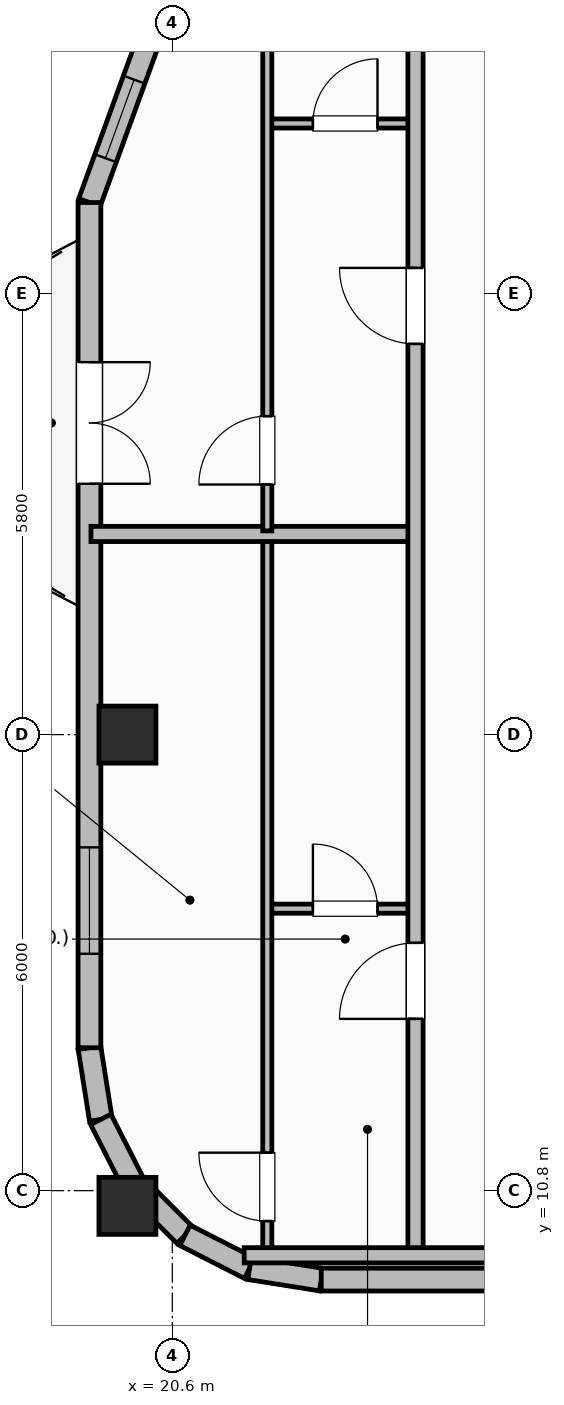
"""IFC4 building model, lengths in metres.
Left out: names, types, materials, properties, quantities, classifications, styles, units other than length and angle.
Written with IfcOpenShell. Run it as: python <this file> out.ifc"""

import sys

from ifc_helpers import new_model, si_unit, direction, frame, frame_2d, origin, origin_2d, place, context, subcontext, project, spatial, rectangle, extrude, element, fill, save


model = new_model("IFC4")
c1 = context("Model", 3, precision=1e-05, world=origin(), true_north=direction((0.0, 1.0)))
c2 = subcontext(c1, "Body", "Model", "MODEL_VIEW")
j1 = project(units=[si_unit("LENGTHUNIT", "METRE"), si_unit("PLANEANGLEUNIT", "RADIAN")], contexts=[c1])
p1 = place(None, origin())
s1 = spatial("IfcSite", under=j1, at=p1, CompositionType="ELEMENT")
p2 = place(p1, origin())
s2 = spatial("IfcBuilding", under=s1, at=p2, CompositionType="ELEMENT")
p3 = place(p2, frame((0.0, 0.0, 267.6)))
s3 = spatial("IfcBuildingStorey", under=s2, at=p3, CompositionType="ELEMENT", Elevation=267.6)
for number, where, z_axis, x_axis in (
    (1, (20.01, 10.6, 0.0), (0.0, 0.0, 1.0), (1.0, 0.0, 0.0)),
    (2, (20.01, 16.8, 0.0), (0.0, 0.0, 1.0), (1.0, 0.0, 0.0)),
):
    element("IfcColumn", number, at=place(p3, frame(where, z_axis=z_axis, x_axis=x_axis)), inside=s3, PredefinedType="COLUMN", context=c2, shape_type="SweptSolid", body=[
        extrude(rectangle(XDim=0.75, YDim=0.75, at=origin_2d()), origin(), (0.0, 0.0, 1.0), 3.7),
    ])
p4 = place(p3, frame((19.51, 12.68, 0.0), z_axis=(0.0, 0.0, 1.0), x_axis=(0.156343617883, -0.987702725088, 0.0)))
e3 = element("IfcWall", 3, at=p4, inside=s3, PredefinedType="SOLIDWALL", context=c2, shape_type="SweptSolid", body=[
    extrude(rectangle(XDim=0.954, YDim=0.3, at=frame_2d((0.477, 0.0))), origin(), (0.0, 0.0, 1.0), 2.73),
])
for number, where, z_axis, x_axis in (
    (4, (19.659, 11.738, 0.0), (0.0, 0.0, 1.0), (0.454, -0.891, 0.0)),
    (5, (20.093, 10.887, 0.0), (0.0, 0.0, 1.0), (0.707, -0.707, 0.0)),
):
    element("IfcWall", number, at=place(p3, frame(where, z_axis=z_axis, x_axis=x_axis)), inside=s3, PredefinedType="SOLIDWALL", context=c2, shape_type="SweptSolid", body=[
        extrude(rectangle(XDim=0.954, YDim=0.3, at=frame_2d((0.477, 0.0))), origin(), (0.0, 0.0, 1.0), 2.73),
    ])
p5 = place(p3, frame((20.767, 10.212, 0.0), z_axis=(0.0, 0.0, 1.0), x_axis=(0.891023873617, -0.45395644796, 0.0)))
e6 = element("IfcWall", 6, at=p5, inside=s3, PredefinedType="SOLIDWALL", context=c2, shape_type="SweptSolid", body=[
    extrude(rectangle(XDim=0.954, YDim=0.3, at=frame_2d((0.477, 0.0))), origin(), (0.0, 0.0, 1.0), 2.73),
])
p6 = place(p3, frame((21.617, 9.779, 0.0), z_axis=(0.0, 0.0, 1.0), x_axis=(0.987669453596, -0.156553666304, 0.0)))
e7 = element("IfcWall", 7, at=p6, inside=s3, PredefinedType="SOLIDWALL", context=c2, shape_type="SweptSolid", body=[
    extrude(rectangle(XDim=0.954, YDim=0.3, at=frame_2d((0.477, 0.0))), origin(), (0.0, 0.0, 1.0), 2.73),
])
p7 = place(p3, frame((22.56, 9.63, 0.0), z_axis=(0.0, 0.0, 1.0), x_axis=(1.0, 0.0, 0.0)))
e8 = element("IfcWall", 8, at=p7, inside=s3, PredefinedType="SOLIDWALL", context=c2, shape_type="SweptSolid", body=[
    extrude(rectangle(XDim=33.28, YDim=0.3, at=frame_2d((16.64, 0.0))), origin(), (0.0, 0.0, 1.0), 2.73),
])
p8 = place(p7, frame((4.311, 0.0, 0.76)))
e9 = element("IfcOpeningElement", 9, at=p8, cuts=e8, PredefinedType="OPENING", context=c2, shape_type="SweptSolid", body=[
    extrude(rectangle(XDim=1.4, YDim=1.85, at=frame_2d((0.7, 0.925))), frame((0.0, 0.16, 0.0), z_axis=(0.0, -1.0, 0.0), x_axis=(1.0, 0.0, 0.0)), (0.0, 0.0, 1.0), 0.32),
])
p9 = place(p7, frame((7.218, 0.0, 0.76)))
e10 = element("IfcOpeningElement", 10, at=p9, cuts=e8, PredefinedType="OPENING", context=c2, shape_type="SweptSolid", body=[
    extrude(rectangle(XDim=1.4, YDim=1.85, at=frame_2d((0.7, 0.925))), frame((0.0, 0.16, 0.0), z_axis=(0.0, -1.0, 0.0), x_axis=(1.0, 0.0, 0.0)), (0.0, 0.0, 1.0), 0.32),
])
p10 = place(p7, frame((9.775, 0.0, 0.76)))
e11 = element("IfcOpeningElement", 11, at=p10, cuts=e8, PredefinedType="OPENING", context=c2, shape_type="SweptSolid", body=[
    extrude(rectangle(XDim=1.4, YDim=1.85, at=frame_2d((0.7, 0.925))), frame((0.0, 0.16, 0.0), z_axis=(0.0, -1.0, 0.0), x_axis=(1.0, 0.0, 0.0)), (0.0, 0.0, 1.0), 0.32),
])
p11 = place(p7, frame((14.083, 0.0, 0.76)))
e12 = element("IfcOpeningElement", 12, at=p11, cuts=e8, PredefinedType="OPENING", context=c2, shape_type="SweptSolid", body=[
    extrude(rectangle(XDim=1.4, YDim=1.85, at=frame_2d((0.7, 0.925))), frame((0.0, 0.16, 0.0), z_axis=(0.0, -1.0, 0.0), x_axis=(1.0, 0.0, 0.0)), (0.0, 0.0, 1.0), 0.32),
])
p12 = place(p7, frame((15.94, 0.0, 0.76)))
e13 = element("IfcOpeningElement", 13, at=p12, cuts=e8, PredefinedType="OPENING", context=c2, shape_type="SweptSolid", body=[
    extrude(rectangle(XDim=1.4, YDim=1.85, at=frame_2d((0.7, 0.925))), frame((0.0, 0.16, 0.0), z_axis=(0.0, -1.0, 0.0), x_axis=(1.0, 0.0, 0.0)), (0.0, 0.0, 1.0), 0.32),
])
p13 = place(p7, frame((17.797, 0.0, 0.76)))
e14 = element("IfcOpeningElement", 14, at=p13, cuts=e8, PredefinedType="OPENING", context=c2, shape_type="SweptSolid", body=[
    extrude(rectangle(XDim=1.4, YDim=1.85, at=frame_2d((0.7, 0.925))), frame((0.0, 0.16, 0.0), z_axis=(0.0, -1.0, 0.0), x_axis=(1.0, 0.0, 0.0)), (0.0, 0.0, 1.0), 0.32),
])
p14 = place(p7, frame((22.104, 0.0, 0.76)))
e15 = element("IfcOpeningElement", 15, at=p14, cuts=e8, PredefinedType="OPENING", context=c2, shape_type="SweptSolid", body=[
    extrude(rectangle(XDim=1.4, YDim=1.85, at=frame_2d((0.7, 0.925))), frame((0.0, 0.16, 0.0), z_axis=(0.0, -1.0, 0.0), x_axis=(1.0, 0.0, 0.0)), (0.0, 0.0, 1.0), 0.32),
])
p15 = place(p7, frame((24.662, 0.0, 0.76)))
e16 = element("IfcOpeningElement", 16, at=p15, cuts=e8, PredefinedType="OPENING", context=c2, shape_type="SweptSolid", body=[
    extrude(rectangle(XDim=1.4, YDim=1.85, at=frame_2d((0.7, 0.925))), frame((0.0, 0.16, 0.0), z_axis=(0.0, -1.0, 0.0), x_axis=(1.0, 0.0, 0.0)), (0.0, 0.0, 1.0), 0.32),
])
p16 = place(p7, frame((27.569, 0.0, 0.76)))
e17 = element("IfcOpeningElement", 17, at=p16, cuts=e8, PredefinedType="OPENING", context=c2, shape_type="SweptSolid", body=[
    extrude(rectangle(XDim=1.4, YDim=1.85, at=frame_2d((0.7, 0.925))), frame((0.0, 0.16, 0.0), z_axis=(0.0, -1.0, 0.0), x_axis=(1.0, 0.0, 0.0)), (0.0, 0.0, 1.0), 0.32),
])
p17 = place(p3, frame((20.31, 26.0, 0.0), z_axis=(0.0, 0.0, 1.0), x_axis=(-0.341768184638, -0.939784287999, 0.0)))
e18 = element("IfcWall", 18, at=p17, inside=s3, PredefinedType="SOLIDWALL", context=c2, shape_type="SweptSolid", body=[
    extrude(rectangle(XDim=2.341, YDim=0.3, at=frame_2d((1.17, 0.0))), origin(), (0.0, 0.0, 1.0), 2.73),
])
p18 = place(p17, frame((0.621, 0.0, 0.92)))
e19 = element("IfcOpeningElement", 19, at=p18, cuts=e18, PredefinedType="OPENING", context=c2, shape_type="SweptSolid", body=[
    extrude(rectangle(XDim=1.1, YDim=1.65, at=frame_2d((0.55, 0.825))), frame((0.0, 0.16, 0.0), z_axis=(0.0, -1.0, 0.0), x_axis=(1.0, 0.0, 0.0)), (0.0, 0.0, 1.0), 0.32),
])
p19 = place(p3, frame((19.51, 23.8, 0.0), z_axis=(0.0, 0.0, 1.0), x_axis=(0.0, -1.0, 0.0)))
e20 = element("IfcWall", 20, at=p19, inside=s3, PredefinedType="SOLIDWALL", context=c2, shape_type="SweptSolid", body=[
    extrude(rectangle(XDim=11.12, YDim=0.3, at=frame_2d((5.56, 0.0))), origin(), (0.0, 0.0, 1.0), 2.73),
])
p20 = place(p19, frame((2.1, 0.0, 0.0)))
e21 = element("IfcOpeningElement", 21, at=p20, cuts=e20, PredefinedType="OPENING", context=c2, shape_type="SweptSolid", body=[
    extrude(rectangle(XDim=1.6, YDim=2.1, at=frame_2d((0.8, 1.05))), frame((0.0, 0.16, 0.0), z_axis=(0.0, -1.0, 0.0), x_axis=(1.0, 0.0, 0.0)), (0.0, 0.0, 1.0), 0.32),
])
p21 = place(p19, frame((8.483, 0.0, 0.76)))
e22 = element("IfcOpeningElement", 22, at=p21, cuts=e20, PredefinedType="OPENING", context=c2, shape_type="SweptSolid", body=[
    extrude(rectangle(XDim=1.4, YDim=1.85, at=frame_2d((0.7, 0.925))), frame((0.0, 0.16, 0.0), z_axis=(0.0, -1.0, 0.0), x_axis=(1.0, 0.0, 0.0)), (0.0, 0.0, 1.0), 0.32),
])
p22 = place(p3, frame((21.85, 14.51, 0.0), z_axis=(0.0, 0.0, 1.0), x_axis=(1.0, 0.0, 0.0)))
e23 = element("IfcWall", 23, at=p22, inside=s3, PredefinedType="PARTITIONING", context=c2, shape_type="SweptSolid", body=[
    extrude(rectangle(XDim=1.95, YDim=0.12, at=frame_2d((0.975, 0.0))), origin(), (0.0, 0.0, 1.0), 2.56),
])
p23 = place(p22, frame((0.6, 0.0, 0.0)))
e24 = element("IfcOpeningElement", 24, at=p23, cuts=e23, PredefinedType="OPENING", context=c2, shape_type="SweptSolid", body=[
    extrude(rectangle(XDim=0.85, YDim=2.1, at=frame_2d((0.425, 1.05))), frame((0.0, 0.07, 0.0), z_axis=(0.0, -1.0, 0.0), x_axis=(1.0, 0.0, 0.0)), (0.0, 0.0, 1.0), 0.14),
])
p24 = place(p3, frame((21.85, 9.99, 0.0), z_axis=(0.0, 0.0, 1.0), x_axis=(0.0, 1.0, 0.0)))
e25 = element("IfcWall", 25, at=p24, inside=s3, PredefinedType="PARTITIONING", context=c2, shape_type="SweptSolid", body=[
    extrude(rectangle(XDim=9.41, YDim=0.12, at=frame_2d((4.705, 0.0))), origin(), (0.0, 0.0, 1.0), 2.56),
])
p25 = place(p24, frame((0.41, 0.0, 0.0)))
e26 = element("IfcOpeningElement", 26, at=p25, cuts=e25, PredefinedType="OPENING", context=c2, shape_type="SweptSolid", body=[
    extrude(rectangle(XDim=0.9, YDim=2.1, at=frame_2d((0.45, 1.05))), frame((0.0, 0.07, 0.0), z_axis=(0.0, -1.0, 0.0), x_axis=(1.0, 0.0, 0.0)), (0.0, 0.0, 1.0), 0.14),
])
p26 = place(p3, frame((19.53, 19.44, 0.0), z_axis=(0.0, 0.0, 1.0), x_axis=(1.0, 0.0, 0.0)))
e27 = element("IfcWall", 27, at=p26, inside=s3, PredefinedType="PARTITIONING", context=c2, shape_type="SweptSolid", body=[
    extrude(rectangle(XDim=4.27, YDim=0.2, at=frame_2d((2.135, 0.0))), origin(), (0.0, 0.0, 1.0), 2.56),
])
p27 = place(p3, frame((21.85, 24.84, 0.0), z_axis=(0.0, 0.0, 1.0), x_axis=(1.0, 0.0, 0.0)))
e28 = element("IfcWall", 28, at=p27, inside=s3, PredefinedType="PARTITIONING", context=c2, shape_type="SweptSolid", body=[
    extrude(rectangle(XDim=1.95, YDim=0.12, at=frame_2d((0.975, 0.0))), origin(), (0.0, 0.0, 1.0), 2.56),
])
p28 = place(p27, frame((0.6, 0.0, 0.0)))
e29 = element("IfcOpeningElement", 29, at=p28, cuts=e28, PredefinedType="OPENING", context=c2, shape_type="SweptSolid", body=[
    extrude(rectangle(XDim=0.85, YDim=2.1, at=frame_2d((0.425, 1.05))), frame((0.0, 0.07, 0.0), z_axis=(0.0, -1.0, 0.0), x_axis=(1.0, 0.0, 0.0)), (0.0, 0.0, 1.0), 0.14),
])
p29 = place(p3, frame((21.85, 19.48, 0.0), z_axis=(0.0, 0.0, 1.0), x_axis=(0.0, 1.0, 0.0)))
e30 = element("IfcWall", 30, at=p29, inside=s3, PredefinedType="PARTITIONING", context=c2, shape_type="SweptSolid", body=[
    extrude(rectangle(XDim=13.23, YDim=0.12, at=frame_2d((6.615, 0.0))), origin(), (0.0, 0.0, 1.0), 2.56),
])
p30 = place(p29, frame((0.61, 0.0, 0.0)))
e31 = element("IfcOpeningElement", 31, at=p30, cuts=e30, PredefinedType="OPENING", context=c2, shape_type="SweptSolid", body=[
    extrude(rectangle(XDim=0.9, YDim=2.1, at=frame_2d((0.45, 1.05))), frame((0.0, 0.07, 0.0), z_axis=(0.0, -1.0, 0.0), x_axis=(1.0, 0.0, 0.0)), (0.0, 0.0, 1.0), 0.14),
])
p31 = place(p29, frame((10.79, 0.0, 0.0)))
e32 = element("IfcOpeningElement", 32, at=p31, cuts=e30, PredefinedType="OPENING", context=c2, shape_type="SweptSolid", body=[
    extrude(rectangle(XDim=0.82, YDim=2.08, at=frame_2d((0.41, 1.04))), frame((0.0, 0.07, 0.0), z_axis=(0.0, -1.0, 0.0), x_axis=(1.0, 0.0, 0.0)), (0.0, 0.0, 1.0), 0.14),
])
p32 = place(p3, frame((23.8, 9.95, 0.0), z_axis=(0.0, 0.0, 1.0), x_axis=(0.0, 1.0, 0.0)))
e33 = element("IfcWall", 33, at=p32, inside=s3, PredefinedType="PARTITIONING", context=c2, shape_type="SweptSolid", body=[
    extrude(rectangle(XDim=36.5, YDim=0.2, at=frame_2d((18.25, 0.0))), origin(), (0.0, 0.0, 1.0), 2.56),
])
p33 = place(p32, frame((3.11, 0.0, 0.0)))
e34 = element("IfcOpeningElement", 34, at=p33, cuts=e33, PredefinedType="OPENING", context=c2, shape_type="SweptSolid", body=[
    extrude(rectangle(XDim=1.0, YDim=2.15, at=frame_2d((0.5, 1.075))), frame((0.0, 0.11, 0.0), z_axis=(0.0, -1.0, 0.0), x_axis=(1.0, 0.0, 0.0)), (0.0, 0.0, 1.0), 0.22),
])
p34 = place(p32, frame((11.99, 0.0, 0.0)))
e35 = element("IfcOpeningElement", 35, at=p34, cuts=e33, PredefinedType="OPENING", context=c2, shape_type="SweptSolid", body=[
    extrude(rectangle(XDim=1.0, YDim=2.15, at=frame_2d((0.5, 1.075))), frame((0.0, 0.11, 0.0), z_axis=(0.0, -1.0, 0.0), x_axis=(1.0, 0.0, 0.0)), (0.0, 0.0, 1.0), 0.22),
])
p35 = place(p32, frame((23.5, 0.0, 0.0)))
e36 = element("IfcOpeningElement", 36, at=p35, cuts=e33, PredefinedType="OPENING", context=c2, shape_type="SweptSolid", body=[
    extrude(rectangle(XDim=1.0, YDim=2.15, at=frame_2d((0.5, 1.075))), frame((0.0, 0.11, 0.0), z_axis=(0.0, -1.0, 0.0), x_axis=(1.0, 0.0, 0.0)), (0.0, 0.0, 1.0), 0.22),
])
p36 = place(p32, frame((31.2, 0.0, 0.0)))
e37 = element("IfcOpeningElement", 37, at=p36, cuts=e33, PredefinedType="OPENING", context=c2, shape_type="SweptSolid", body=[
    extrude(rectangle(XDim=1.0, YDim=2.15, at=frame_2d((0.5, 1.075))), frame((0.0, 0.11, 0.0), z_axis=(0.0, -1.0, 0.0), x_axis=(1.0, 0.0, 0.0)), (0.0, 0.0, 1.0), 0.22),
])
p37 = place(p3, frame((21.546, 9.95, 0.0), z_axis=(0.0, 0.0, 1.0), x_axis=(1.0, 0.0, 0.0)))
e38 = element("IfcWall", 38, at=p37, inside=s3, PredefinedType="PARTITIONING", context=c2, shape_type="SweptSolid", body=[
    extrude(rectangle(XDim=3.754, YDim=0.2, at=frame_2d((1.877, 0.0))), origin(), (0.0, 0.0, 1.0), 2.56),
])
p38 = place(p18, origin())
e39 = element("IfcWindow", 39, at=p38, inside=s3, PartitioningType="SINGLE_PANEL", PredefinedType="WINDOW", context=c2, shape_type="SweptSolid", body=[
    extrude(rectangle(XDim=1.1, YDim=1.65, at=frame_2d((0.55, 0.825))), frame((0.0, 0.03, 0.0), z_axis=(0.0, -1.0, 0.0), x_axis=(1.0, 0.0, 0.0)), (0.0, 0.0, 1.0), 0.06),
])
fill(e19, e39)
p39 = place(p20, origin())
e40 = element("IfcDoor", 40, at=p39, inside=s3, OperationType="DOUBLE_DOOR_SINGLE_SWING", PredefinedType="DOOR", context=c2, shape_type="SweptSolid", body=[
    extrude(rectangle(XDim=1.6, YDim=2.1, at=frame_2d((0.8, 1.05))), frame((0.0, 0.025, 0.0), z_axis=(0.0, -1.0, 0.0), x_axis=(1.0, 0.0, 0.0)), (0.0, 0.0, 1.0), 0.05),
])
fill(e21, e40)
p40 = place(p21, origin())
e41 = element("IfcWindow", 41, at=p40, inside=s3, PartitioningType="SINGLE_PANEL", PredefinedType="WINDOW", context=c2, shape_type="SweptSolid", body=[
    extrude(rectangle(XDim=1.4, YDim=1.85, at=frame_2d((0.7, 0.925))), frame((0.0, 0.03, 0.0), z_axis=(0.0, -1.0, 0.0), x_axis=(1.0, 0.0, 0.0)), (0.0, 0.0, 1.0), 0.06),
])
fill(e22, e41)
p41 = place(p23, origin())
e42 = element("IfcDoor", 42, at=p41, inside=s3, OperationType="SINGLE_SWING_LEFT", PredefinedType="DOOR", context=c2, shape_type="SweptSolid", body=[
    extrude(rectangle(XDim=0.85, YDim=2.1, at=frame_2d((0.425, 1.05))), frame((0.0, 0.025, 0.0), z_axis=(0.0, -1.0, 0.0), x_axis=(1.0, 0.0, 0.0)), (0.0, 0.0, 1.0), 0.05),
])
fill(e24, e42)
p42 = place(p25, origin())
e43 = element("IfcDoor", 43, at=p42, inside=s3, OperationType="SINGLE_SWING_RIGHT", PredefinedType="DOOR", context=c2, shape_type="SweptSolid", body=[
    extrude(rectangle(XDim=0.9, YDim=2.1, at=frame_2d((0.45, 1.05))), frame((0.0, 0.025, 0.0), z_axis=(0.0, -1.0, 0.0), x_axis=(1.0, 0.0, 0.0)), (0.0, 0.0, 1.0), 0.05),
])
fill(e26, e43)
p43 = place(p28, origin())
e44 = element("IfcDoor", 44, at=p43, inside=s3, OperationType="SINGLE_SWING_RIGHT", PredefinedType="DOOR", context=c2, shape_type="SweptSolid", body=[
    extrude(rectangle(XDim=0.85, YDim=2.1, at=frame_2d((0.425, 1.05))), frame((0.0, 0.025, 0.0), z_axis=(0.0, -1.0, 0.0), x_axis=(1.0, 0.0, 0.0)), (0.0, 0.0, 1.0), 0.05),
])
fill(e29, e44)
p44 = place(p30, origin())
e45 = element("IfcDoor", 45, at=p44, inside=s3, OperationType="SINGLE_SWING_LEFT", PredefinedType="DOOR", context=c2, shape_type="SweptSolid", body=[
    extrude(rectangle(XDim=0.9, YDim=2.1, at=frame_2d((0.45, 1.05))), frame((0.0, 0.025, 0.0), z_axis=(0.0, -1.0, 0.0), x_axis=(1.0, 0.0, 0.0)), (0.0, 0.0, 1.0), 0.05),
])
fill(e31, e45)
p45 = place(p33, origin())
e46 = element("IfcDoor", 46, at=p45, inside=s3, OperationType="SINGLE_SWING_LEFT", PredefinedType="DOOR", context=c2, shape_type="SweptSolid", body=[
    extrude(rectangle(XDim=1.0, YDim=2.15, at=frame_2d((0.5, 1.075))), frame((0.0, 0.025, 0.0), z_axis=(0.0, -1.0, 0.0), x_axis=(1.0, 0.0, 0.0)), (0.0, 0.0, 1.0), 0.05),
])
fill(e34, e46)
p46 = place(p34, origin())
e47 = element("IfcDoor", 47, at=p46, inside=s3, OperationType="SINGLE_SWING_RIGHT", PredefinedType="DOOR", context=c2, shape_type="SweptSolid", body=[
    extrude(rectangle(XDim=1.0, YDim=2.15, at=frame_2d((0.5, 1.075))), frame((0.0, 0.025, 0.0), z_axis=(0.0, -1.0, 0.0), x_axis=(1.0, 0.0, 0.0)), (0.0, 0.0, 1.0), 0.05),
])
fill(e35, e47)
save(model, sys.argv[1])
